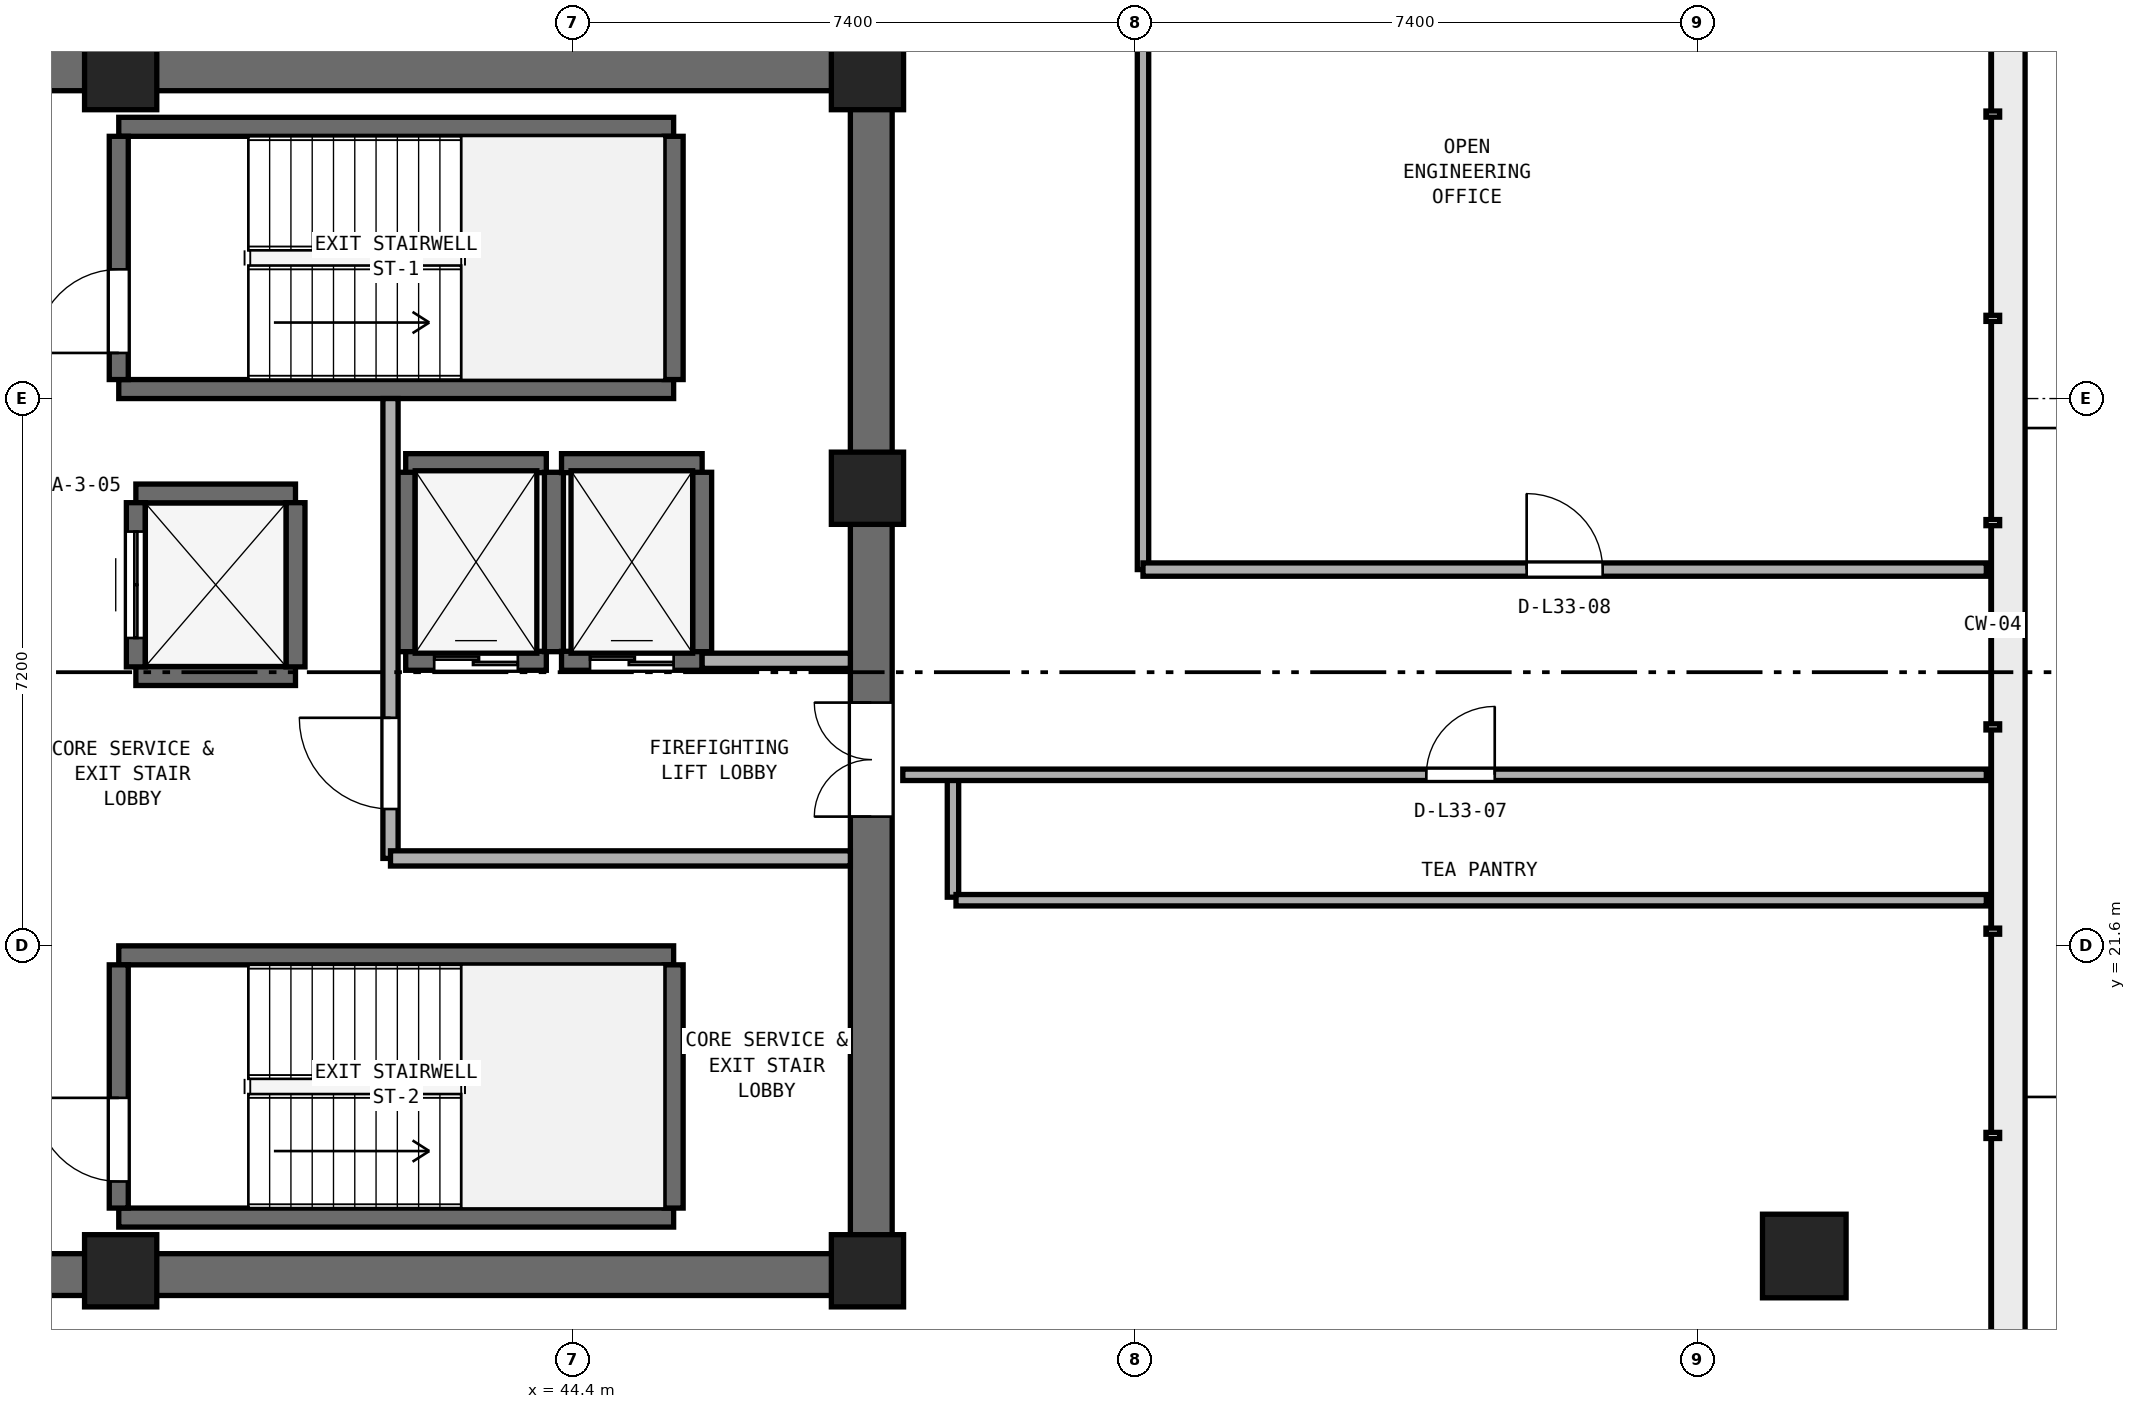
"""IFC4 building model, lengths in metres.
Left out: names, types, materials, properties, quantities, classifications, styles, units other than length and angle.
Written with IfcOpenShell. Run it as: python <this file> out.ifc"""

import sys

from ifc_helpers import new_model, si_unit, direction, frame, frame_2d, origin, origin_2d, place, context, subcontext, project, spatial, rectangle, extrude, element, fill, save


model = new_model("IFC4")
c1 = context("Model", 3, precision=1e-05, world=origin(), true_north=direction((0.0, 1.0)))
c2 = subcontext(c1, "Body", "Model", "MODEL_VIEW")
j1 = project(units=[si_unit("LENGTHUNIT", "METRE"), si_unit("PLANEANGLEUNIT", "RADIAN")], contexts=[c1])
p1 = place(None, origin())
s1 = spatial("IfcSite", under=j1, at=p1, CompositionType="ELEMENT")
p2 = place(p1, origin())
s2 = spatial("IfcBuilding", under=s1, at=p2, CompositionType="ELEMENT")
p3 = place(p2, frame((0.0, 0.0, 132.6)))
s3 = spatial("IfcBuildingStorey", under=s2, at=p3, CompositionType="ELEMENT", Elevation=132.6)
for number, where, z_axis, x_axis in (
    (1, (25.4, 17.275, 0.0), (0.0, 0.0, 1.0), (1.0, 0.0, 0.0)),
    (2, (25.4, 33.125, 0.0), (0.0, 0.0, 1.0), (1.0, 0.0, 0.0)),
):
    element("IfcWall", number, at=place(p3, frame(where, z_axis=z_axis, x_axis=x_axis)), inside=s3, PredefinedType="SHEAR", context=c2, shape_type="SweptSolid", body=[
        extrude(rectangle(XDim=23.2, YDim=0.55, at=frame_2d((11.6, 0.0))), origin(), (0.0, 0.0, 1.0), 3.54),
    ])
p4 = place(p3, frame((48.325, 17.55, 0.0), z_axis=(0.0, 0.0, 1.0), x_axis=(0.0, 1.0, 0.0)))
e3 = element("IfcWall", 3, at=p4, inside=s3, PredefinedType="SHEAR", context=c2, shape_type="SweptSolid", body=[
    extrude(rectangle(XDim=15.3, YDim=0.55, at=frame_2d((7.65, 0.0))), origin(), (0.0, 0.0, 1.0), 3.54),
])
p5 = place(p4, frame((5.75, 0.0, 0.0)))
e4 = element("IfcOpeningElement", 4, at=p5, cuts=e3, PredefinedType="OPENING", context=c2, shape_type="SweptSolid", body=[
    extrude(rectangle(XDim=1.5, YDim=2.15, at=frame_2d((0.75, 1.075))), frame((0.0, 0.285, 0.0), z_axis=(0.0, -1.0, 0.0), x_axis=(1.0, 0.0, 0.0)), (0.0, 0.0, 1.0), 0.57),
])
for number, where, z_axis, x_axis in (
    (5, (38.45, 17.325, 0.0), (0.0, 0.0, 1.0), (1.0, 0.0, 0.0)),
    (6, (48.275, 17.325, 0.0), (0.0, 0.0, 1.0), (1.0, 0.0, 0.0)),
    (7, (48.275, 27.62, 0.0), (0.0, 0.0, 1.0), (1.0, 0.0, 0.0)),
    (8, (48.275, 33.075, 0.0), (0.0, 0.0, 1.0), (1.0, 0.0, 0.0)),
    (9, (38.45, 33.075, 0.0), (0.0, 0.0, 1.0), (1.0, 0.0, 0.0)),
):
    element("IfcColumn", number, at=place(p3, frame(where, z_axis=z_axis, x_axis=x_axis)), inside=s3, PredefinedType="PILASTER", context=c2, shape_type="SweptSolid", body=[
        extrude(rectangle(XDim=0.95, YDim=0.95, at=origin_2d()), origin(), (0.0, 0.0, 1.0), 3.8),
    ])
p6 = place(p3, frame((60.6, 17.519, 0.0), z_axis=(0.0, 0.0, 1.0), x_axis=(1.0, 0.0, 0.0)))
e10 = element("IfcColumn", 10, at=p6, inside=s3, PredefinedType="COLUMN", context=c2, shape_type="SweptSolid", body=[
    extrude(rectangle(XDim=1.1, YDim=1.1, at=origin_2d()), origin(), (0.0, 0.0, 1.0), 3.8),
])
for number, where, z_axis, x_axis in (
    (11, (38.425, 28.925, 0.0), (0.0, 0.0, 1.0), (1.0, 0.0, 0.0)),
    (12, (38.425, 32.375, 0.0), (0.0, 0.0, 1.0), (1.0, 0.0, 0.0)),
):
    element("IfcWall", number, at=place(p3, frame(where, z_axis=z_axis, x_axis=x_axis)), inside=s3, PredefinedType="SHEAR", context=c2, shape_type="SweptSolid", body=[
        extrude(rectangle(XDim=7.3, YDim=0.25, at=frame_2d((3.65, 0.0))), origin(), (0.0, 0.0, 1.0), 3.54),
    ])
p7 = place(p3, frame((38.425, 29.05, 0.0), z_axis=(0.0, 0.0, 1.0), x_axis=(0.0, 1.0, 0.0)))
e13 = element("IfcWall", 13, at=p7, inside=s3, PredefinedType="SHEAR", context=c2, shape_type="SweptSolid", body=[
    extrude(rectangle(XDim=3.2, YDim=0.25, at=frame_2d((1.6, 0.0))), origin(), (0.0, 0.0, 1.0), 3.54),
])
p8 = place(p7, frame((0.35, 0.0, 0.0)))
e14 = element("IfcOpeningElement", 14, at=p8, cuts=e13, PredefinedType="OPENING", context=c2, shape_type="SweptSolid", body=[
    extrude(rectangle(XDim=1.1, YDim=2.15, at=frame_2d((0.55, 1.075))), frame((0.0, 0.135, 0.0), z_axis=(0.0, -1.0, 0.0), x_axis=(1.0, 0.0, 0.0)), (0.0, 0.0, 1.0), 0.27),
])
p9 = place(p3, frame((45.725, 29.05, 0.0), z_axis=(0.0, 0.0, 1.0), x_axis=(0.0, 1.0, 0.0)))
e15 = element("IfcWall", 15, at=p9, inside=s3, PredefinedType="SHEAR", context=c2, shape_type="SweptSolid", body=[
    extrude(rectangle(XDim=3.2, YDim=0.25, at=frame_2d((1.6, 0.0))), origin(), (0.0, 0.0, 1.0), 3.54),
])
for number, where, z_axis, x_axis in (
    (16, (38.425, 18.025, 0.0), (0.0, 0.0, 1.0), (1.0, 0.0, 0.0)),
    (17, (38.425, 21.475, 0.0), (0.0, 0.0, 1.0), (1.0, 0.0, 0.0)),
):
    element("IfcWall", number, at=place(p3, frame(where, z_axis=z_axis, x_axis=x_axis)), inside=s3, PredefinedType="SHEAR", context=c2, shape_type="SweptSolid", body=[
        extrude(rectangle(XDim=7.3, YDim=0.25, at=frame_2d((3.65, 0.0))), origin(), (0.0, 0.0, 1.0), 3.54),
    ])
p10 = place(p3, frame((38.425, 18.15, 0.0), z_axis=(0.0, 0.0, 1.0), x_axis=(0.0, 1.0, 0.0)))
e18 = element("IfcWall", 18, at=p10, inside=s3, PredefinedType="SHEAR", context=c2, shape_type="SweptSolid", body=[
    extrude(rectangle(XDim=3.2, YDim=0.25, at=frame_2d((1.6, 0.0))), origin(), (0.0, 0.0, 1.0), 3.54),
])
p11 = place(p10, frame((0.35, 0.0, 0.0)))
e19 = element("IfcOpeningElement", 19, at=p11, cuts=e18, PredefinedType="OPENING", context=c2, shape_type="SweptSolid", body=[
    extrude(rectangle(XDim=1.1, YDim=2.15, at=frame_2d((0.55, 1.075))), frame((0.0, 0.135, 0.0), z_axis=(0.0, -1.0, 0.0), x_axis=(1.0, 0.0, 0.0)), (0.0, 0.0, 1.0), 0.27),
])
p12 = place(p3, frame((45.725, 18.15, 0.0), z_axis=(0.0, 0.0, 1.0), x_axis=(0.0, 1.0, 0.0)))
e20 = element("IfcWall", 20, at=p12, inside=s3, PredefinedType="SHEAR", context=c2, shape_type="SweptSolid", body=[
    extrude(rectangle(XDim=3.2, YDim=0.25, at=frame_2d((1.6, 0.0))), origin(), (0.0, 0.0, 1.0), 3.54),
])
p13 = place(p3, frame((42.2, 25.35, 0.0), z_axis=(0.0, 0.0, 1.0), x_axis=(1.0, 0.0, 0.0)))
e21 = element("IfcWall", 21, at=p13, inside=s3, PredefinedType="SHEAR", context=c2, shape_type="SweptSolid", body=[
    extrude(rectangle(XDim=1.85, YDim=0.25, at=frame_2d((0.925, 0.0))), origin(), (0.0, 0.0, 1.0), 3.54),
])
p14 = place(p13, frame((0.375, 0.0, 0.0)))
e22 = element("IfcOpeningElement", 22, at=p14, cuts=e21, PredefinedType="OPENING", context=c2, shape_type="SweptSolid", body=[
    extrude(rectangle(XDim=1.1, YDim=2.15, at=frame_2d((0.55, 1.075))), frame((0.0, 0.135, 0.0), z_axis=(0.0, -1.0, 0.0), x_axis=(1.0, 0.0, 0.0)), (0.0, 0.0, 1.0), 0.27),
])
p15 = place(p3, frame((42.2, 27.95, 0.0), z_axis=(0.0, 0.0, 1.0), x_axis=(1.0, 0.0, 0.0)))
e23 = element("IfcWall", 23, at=p15, inside=s3, PredefinedType="SHEAR", context=c2, shape_type="SweptSolid", body=[
    extrude(rectangle(XDim=1.85, YDim=0.25, at=frame_2d((0.925, 0.0))), origin(), (0.0, 0.0, 1.0), 3.54),
])
for number, where, z_axis, x_axis in (
    (24, (42.2, 25.47, 0.0), (0.0, 0.0, 1.0), (0.0, 1.0, 0.0)),
    (25, (44.15, 25.47, 0.0), (0.0, 0.0, 1.0), (0.0, 1.0, 0.0)),
):
    element("IfcWall", number, at=place(p3, frame(where, z_axis=z_axis, x_axis=x_axis)), inside=s3, PredefinedType="SHEAR", context=c2, shape_type="SweptSolid", body=[
        extrude(rectangle(XDim=2.36, YDim=0.25, at=frame_2d((1.18, 0.0))), origin(), (0.0, 0.0, 1.0), 3.54),
    ])
p16 = place(p3, frame((44.25, 25.35, 0.0), z_axis=(0.0, 0.0, 1.0), x_axis=(1.0, 0.0, 0.0)))
e26 = element("IfcWall", 26, at=p16, inside=s3, PredefinedType="SHEAR", context=c2, shape_type="SweptSolid", body=[
    extrude(rectangle(XDim=1.85, YDim=0.25, at=frame_2d((0.925, 0.0))), origin(), (0.0, 0.0, 1.0), 3.54),
])
p17 = place(p16, frame((0.375, 0.0, 0.0)))
e27 = element("IfcOpeningElement", 27, at=p17, cuts=e26, PredefinedType="OPENING", context=c2, shape_type="SweptSolid", body=[
    extrude(rectangle(XDim=1.1, YDim=2.15, at=frame_2d((0.55, 1.075))), frame((0.0, 0.135, 0.0), z_axis=(0.0, -1.0, 0.0), x_axis=(1.0, 0.0, 0.0)), (0.0, 0.0, 1.0), 0.27),
])
p18 = place(p3, frame((44.25, 27.95, 0.0), z_axis=(0.0, 0.0, 1.0), x_axis=(1.0, 0.0, 0.0)))
e28 = element("IfcWall", 28, at=p18, inside=s3, PredefinedType="SHEAR", context=c2, shape_type="SweptSolid", body=[
    extrude(rectangle(XDim=1.85, YDim=0.25, at=frame_2d((0.925, 0.0))), origin(), (0.0, 0.0, 1.0), 3.54),
])
p19 = place(p3, frame((46.1, 25.47, 0.0), z_axis=(0.0, 0.0, 1.0), x_axis=(0.0, 1.0, 0.0)))
e29 = element("IfcWall", 29, at=p19, inside=s3, PredefinedType="SHEAR", context=c2, shape_type="SweptSolid", body=[
    extrude(rectangle(XDim=2.36, YDim=0.25, at=frame_2d((1.18, 0.0))), origin(), (0.0, 0.0, 1.0), 3.54),
])
for number, where, z_axis, x_axis in (
    (30, (38.65, 25.15, 0.0), (0.0, 0.0, 1.0), (1.0, 0.0, 0.0)),
    (31, (38.65, 27.55, 0.0), (0.0, 0.0, 1.0), (1.0, 0.0, 0.0)),
):
    element("IfcWall", number, at=place(p3, frame(where, z_axis=z_axis, x_axis=x_axis)), inside=s3, PredefinedType="SHEAR", context=c2, shape_type="SweptSolid", body=[
        extrude(rectangle(XDim=2.1, YDim=0.25, at=frame_2d((1.05, 0.0))), origin(), (0.0, 0.0, 1.0), 3.54),
    ])
p20 = place(p3, frame((38.65, 25.27, 0.0), z_axis=(0.0, 0.0, 1.0), x_axis=(0.0, 1.0, 0.0)))
e32 = element("IfcWall", 32, at=p20, inside=s3, PredefinedType="SHEAR", context=c2, shape_type="SweptSolid", body=[
    extrude(rectangle(XDim=2.16, YDim=0.25, at=frame_2d((1.08, 0.0))), origin(), (0.0, 0.0, 1.0), 3.54),
])
p21 = place(p20, frame((0.38, 0.0, 0.0)))
e33 = element("IfcOpeningElement", 33, at=p21, cuts=e32, PredefinedType="OPENING", context=c2, shape_type="SweptSolid", body=[
    extrude(rectangle(XDim=1.4, YDim=2.2, at=frame_2d((0.7, 1.1))), frame((0.0, 0.135, 0.0), z_axis=(0.0, -1.0, 0.0), x_axis=(1.0, 0.0, 0.0)), (0.0, 0.0, 1.0), 0.27),
])
p22 = place(p3, frame((40.75, 25.27, 0.0), z_axis=(0.0, 0.0, 1.0), x_axis=(0.0, 1.0, 0.0)))
e34 = element("IfcWall", 34, at=p22, inside=s3, PredefinedType="SHEAR", context=c2, shape_type="SweptSolid", body=[
    extrude(rectangle(XDim=2.16, YDim=0.25, at=frame_2d((1.08, 0.0))), origin(), (0.0, 0.0, 1.0), 3.54),
])
p23 = place(p3, frame((42.0, 22.75, 0.0), z_axis=(0.0, 0.0, 1.0), x_axis=(0.0, 1.0, 0.0)))
e35 = element("IfcWall", 35, at=p23, inside=s3, PredefinedType="SOLIDWALL", context=c2, shape_type="SweptSolid", body=[
    extrude(rectangle(XDim=6.05, YDim=0.2, at=frame_2d((3.025, 0.0))), origin(), (0.0, 0.0, 1.0), 3.54),
])
p24 = place(p23, frame((0.65, 0.0, 0.0)))
e36 = element("IfcOpeningElement", 36, at=p24, cuts=e35, PredefinedType="OPENING", context=c2, shape_type="SweptSolid", body=[
    extrude(rectangle(XDim=1.2, YDim=2.15, at=frame_2d((0.6, 1.075))), frame((0.0, 0.11, 0.0), z_axis=(0.0, -1.0, 0.0), x_axis=(1.0, 0.0, 0.0)), (0.0, 0.0, 1.0), 0.22),
])
p25 = place(p3, frame((42.0, 22.75, 0.0), z_axis=(0.0, 0.0, 1.0), x_axis=(1.0, 0.0, 0.0)))
e37 = element("IfcWall", 37, at=p25, inside=s3, PredefinedType="SOLIDWALL", context=c2, shape_type="SweptSolid", body=[
    extrude(rectangle(XDim=6.05, YDim=0.2, at=frame_2d((3.025, 0.0))), origin(), (0.0, 0.0, 1.0), 3.54),
])
p26 = place(p3, frame((46.1, 25.35, 0.0), z_axis=(0.0, 0.0, 1.0), x_axis=(1.0, 0.0, 0.0)))
e38 = element("IfcWall", 38, at=p26, inside=s3, PredefinedType="SOLIDWALL", context=c2, shape_type="SweptSolid", body=[
    extrude(rectangle(XDim=1.95, YDim=0.2, at=frame_2d((0.975, 0.0))), origin(), (0.0, 0.0, 1.0), 3.54),
])
p27 = place(p3, frame((51.9, 26.55, 0.0), z_axis=(0.0, 0.0, 1.0), x_axis=(0.0, 1.0, 0.0)))
e39 = element("IfcWall", 39, at=p27, inside=s3, PredefinedType="PARTITIONING", context=c2, shape_type="SweptSolid", body=[
    extrude(rectangle(XDim=18.767, YDim=0.15, at=frame_2d((9.384, 0.0))), origin(), (0.0, 0.0, 1.0), 3.54),
])
p28 = place(p3, frame((49.4, 22.24, 0.0), z_axis=(0.0, 0.0, 1.0), x_axis=(0.0, 1.0, 0.0)))
e40 = element("IfcWall", 40, at=p28, inside=s3, PredefinedType="PARTITIONING", context=c2, shape_type="SweptSolid", body=[
    extrude(rectangle(XDim=1.609, YDim=0.15, at=frame_2d((0.805, 0.0))), origin(), (0.0, 0.0, 1.0), 3.54),
])
p29 = place(p3, frame((49.44, 22.2, 0.0), z_axis=(0.0, 0.0, 1.0), x_axis=(1.0, 0.0, 0.0)))
e41 = element("IfcWall", 41, at=p29, inside=s3, PredefinedType="PARTITIONING", context=c2, shape_type="SweptSolid", body=[
    extrude(rectangle(XDim=13.555, YDim=0.15, at=frame_2d((6.778, 0.0))), origin(), (0.0, 0.0, 1.0), 3.54),
])
p30 = place(p3, frame((48.74, 23.85, 0.0), z_axis=(0.0, 0.0, 1.0), x_axis=(1.0, 0.0, 0.0)))
e42 = element("IfcWall", 42, at=p30, inside=s3, PredefinedType="PARTITIONING", context=c2, shape_type="SweptSolid", body=[
    extrude(rectangle(XDim=14.255, YDim=0.15, at=frame_2d((7.127, 0.0))), origin(), (0.0, 0.0, 1.0), 3.54),
])
p31 = place(p30, frame((6.887, 0.0, 0.0)))
e43 = element("IfcOpeningElement", 43, at=p31, cuts=e42, PredefinedType="OPENING", context=c2, shape_type="SweptSolid", body=[
    extrude(rectangle(XDim=0.9, YDim=2.1, at=frame_2d((0.45, 1.05))), frame((0.0, 0.085, 0.0), z_axis=(0.0, -1.0, 0.0), x_axis=(1.0, 0.0, 0.0)), (0.0, 0.0, 1.0), 0.17),
])
p32 = place(p3, frame((51.9, 26.55, 0.0), z_axis=(0.0, 0.0, 1.0), x_axis=(1.0, 0.0, 0.0)))
e44 = element("IfcWall", 44, at=p32, inside=s3, PredefinedType="PARTITIONING", context=c2, shape_type="SweptSolid", body=[
    extrude(rectangle(XDim=11.095, YDim=0.175, at=frame_2d((5.548, 0.0))), origin(), (0.0, 0.0, 1.0), 3.54),
])
p33 = place(p32, frame((5.048, 0.0, 0.0)))
e45 = element("IfcOpeningElement", 45, at=p33, cuts=e44, PredefinedType="OPENING", context=c2, shape_type="SweptSolid", body=[
    extrude(rectangle(XDim=1.0, YDim=2.12, at=frame_2d((0.5, 1.06))), frame((0.0, 0.097, 0.0), z_axis=(0.0, -1.0, 0.0), x_axis=(1.0, 0.0, 0.0)), (0.0, 0.0, 1.0), 0.195),
])
p34 = place(p8, origin())
e46 = element("IfcDoor", 46, at=p34, inside=s3, OperationType="SINGLE_SWING_LEFT", PredefinedType="DOOR", context=c2, shape_type="SweptSolid", body=[
    extrude(rectangle(XDim=1.1, YDim=2.15, at=frame_2d((0.55, 1.075))), frame((0.0, 0.025, 0.0), z_axis=(0.0, -1.0, 0.0), x_axis=(1.0, 0.0, 0.0)), (0.0, 0.0, 1.0), 0.05),
])
fill(e14, e46)
p35 = place(p11, origin())
e47 = element("IfcDoor", 47, at=p35, inside=s3, OperationType="SINGLE_SWING_RIGHT", PredefinedType="DOOR", context=c2, shape_type="SweptSolid", body=[
    extrude(rectangle(XDim=1.1, YDim=2.15, at=frame_2d((0.55, 1.075))), frame((0.0, 0.025, 0.0), z_axis=(0.0, -1.0, 0.0), x_axis=(1.0, 0.0, 0.0)), (0.0, 0.0, 1.0), 0.05),
])
fill(e19, e47)
p36 = place(p14, origin())
e48 = element("IfcDoor", 48, at=p36, inside=s3, OperationType="DOUBLE_DOOR_SLIDING", PredefinedType="DOOR", context=c2, shape_type="SweptSolid", body=[
    extrude(rectangle(XDim=1.1, YDim=2.15, at=frame_2d((0.55, 1.075))), frame((0.0, 0.025, 0.0), z_axis=(0.0, -1.0, 0.0), x_axis=(1.0, 0.0, 0.0)), (0.0, 0.0, 1.0), 0.05),
])
fill(e22, e48)
p37 = place(p17, origin())
e49 = element("IfcDoor", 49, at=p37, inside=s3, OperationType="DOUBLE_DOOR_SLIDING", PredefinedType="DOOR", context=c2, shape_type="SweptSolid", body=[
    extrude(rectangle(XDim=1.1, YDim=2.15, at=frame_2d((0.55, 1.075))), frame((0.0, 0.025, 0.0), z_axis=(0.0, -1.0, 0.0), x_axis=(1.0, 0.0, 0.0)), (0.0, 0.0, 1.0), 0.05),
])
fill(e27, e49)
p38 = place(p21, origin())
e50 = element("IfcDoor", 50, at=p38, inside=s3, OperationType="DOUBLE_DOOR_SLIDING", PredefinedType="DOOR", context=c2, shape_type="SweptSolid", body=[
    extrude(rectangle(XDim=1.4, YDim=2.2, at=frame_2d((0.7, 1.1))), frame((0.0, 0.025, 0.0), z_axis=(0.0, -1.0, 0.0), x_axis=(1.0, 0.0, 0.0)), (0.0, 0.0, 1.0), 0.05),
])
fill(e33, e50)
p39 = place(p24, origin())
e51 = element("IfcDoor", 51, at=p39, inside=s3, OperationType="SINGLE_SWING_RIGHT", PredefinedType="DOOR", context=c2, shape_type="SweptSolid", body=[
    extrude(rectangle(XDim=1.2, YDim=2.15, at=frame_2d((0.6, 1.075))), frame((0.0, 0.025, 0.0), z_axis=(0.0, -1.0, 0.0), x_axis=(1.0, 0.0, 0.0)), (0.0, 0.0, 1.0), 0.05),
])
fill(e36, e51)
p40 = place(p5, origin())
e52 = element("IfcDoor", 52, at=p40, inside=s3, OperationType="DOUBLE_DOOR_SINGLE_SWING", PredefinedType="DOOR", context=c2, shape_type="SweptSolid", body=[
    extrude(rectangle(XDim=1.5, YDim=2.15, at=frame_2d((0.75, 1.075))), frame((0.0, 0.025, 0.0), z_axis=(0.0, -1.0, 0.0), x_axis=(1.0, 0.0, 0.0)), (0.0, 0.0, 1.0), 0.05),
])
fill(e4, e52)
p41 = place(p31, origin())
e53 = element("IfcDoor", 53, at=p41, inside=s3, OperationType="SINGLE_SWING_RIGHT", PredefinedType="DOOR", context=c2, shape_type="SweptSolid", body=[
    extrude(rectangle(XDim=0.9, YDim=2.1, at=frame_2d((0.45, 1.05))), frame((0.0, 0.025, 0.0), z_axis=(0.0, -1.0, 0.0), x_axis=(1.0, 0.0, 0.0)), (0.0, 0.0, 1.0), 0.05),
])
fill(e43, e53)
p42 = place(p33, origin())
e54 = element("IfcDoor", 54, at=p42, inside=s3, OperationType="SINGLE_SWING_LEFT", PredefinedType="DOOR", context=c2, shape_type="SweptSolid", body=[
    extrude(rectangle(XDim=1.0, YDim=2.12, at=frame_2d((0.5, 1.06))), frame((0.0, 0.025, 0.0), z_axis=(0.0, -1.0, 0.0), x_axis=(1.0, 0.0, 0.0)), (0.0, 0.0, 1.0), 0.05),
])
fill(e45, e54)
save(model, sys.argv[1])
